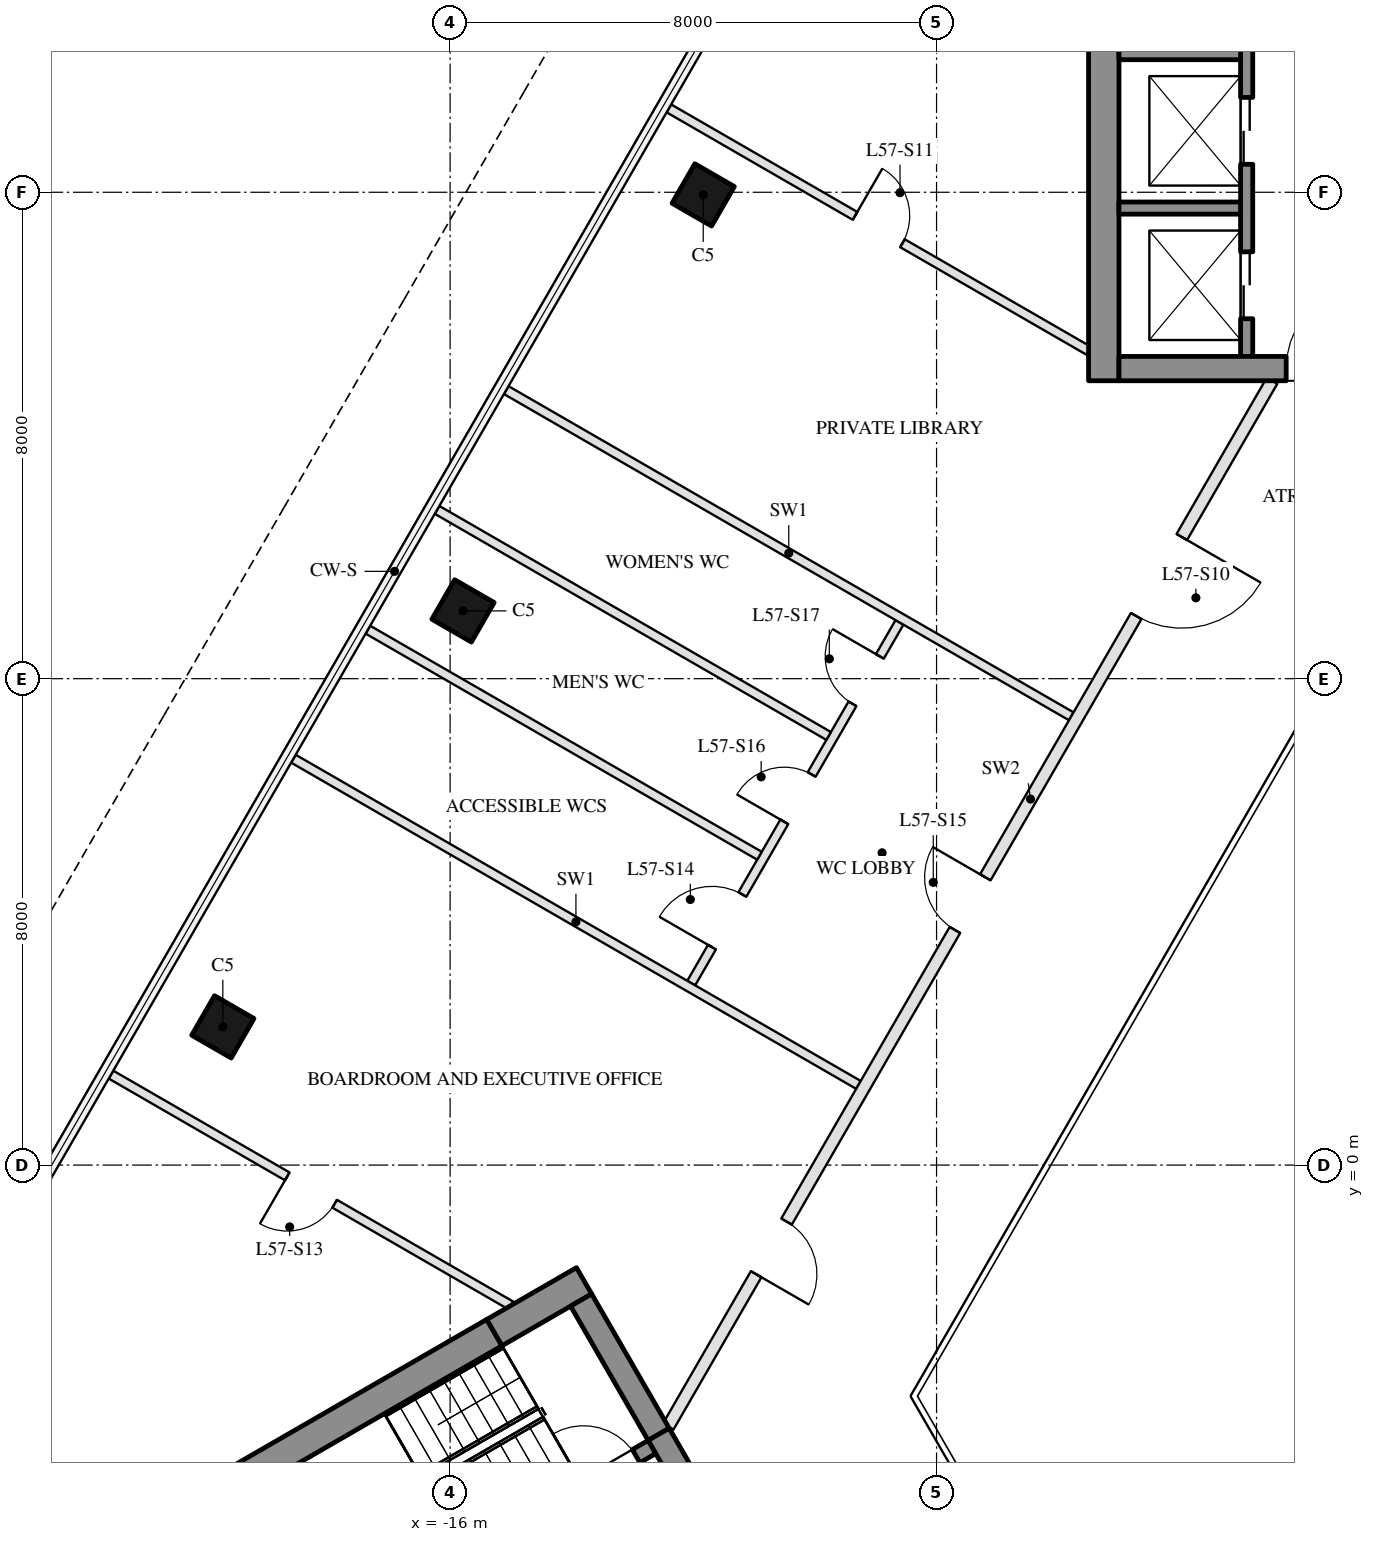
"""IFC4 building model, lengths in metres.
Left out: names, types, materials, properties, quantities, classifications, styles, units other than length and angle.
Written with IfcOpenShell. Run it as: python <this file> out.ifc"""

import sys

from ifc_helpers import new_model, si_unit, direction, frame, frame_2d, origin, origin_2d, place, context, subcontext, project, spatial, rectangle, hollow_rectangle, extrude, element, fill, save


model = new_model("IFC4")
c1 = context("Model", 3, precision=1e-05, world=origin(), true_north=direction((0.0, 1.0)))
c2 = subcontext(c1, "Body", "Model", "MODEL_VIEW")
j1 = project(units=[si_unit("LENGTHUNIT", "METRE"), si_unit("PLANEANGLEUNIT", "RADIAN")], contexts=[c1])
p1 = place(None, origin())
s1 = spatial("IfcSite", under=j1, at=p1, CompositionType="ELEMENT")
p2 = place(p1, origin())
s2 = spatial("IfcBuilding", under=s1, at=p2, CompositionType="ELEMENT")
p3 = place(p2, frame((0.0, 0.0, 231.7)))
s3 = spatial("IfcBuildingStorey", under=s2, at=p3, CompositionType="ELEMENT", Elevation=231.7)
for number, where, z_axis, x_axis in (
    (1, (-11.838, 15.957, 0.0), (0.0, 0.0, 1.0), (0.5, 0.866, 0.0)),
    (2, (-15.788, 9.115, 0.0), (0.0, 0.0, 1.0), (0.5, 0.866, 0.0)),
    (3, (-19.738, 2.273, 0.0), (0.0, 0.0, 1.0), (0.5, 0.866, 0.0)),
):
    element("IfcColumn", number, at=place(p3, frame(where, z_axis=z_axis, x_axis=x_axis)), inside=s3, PredefinedType="COLUMN", context=c2, shape_type="SweptSolid", body=[
        extrude(hollow_rectangle(XDim=0.75, YDim=0.75, WallThickness=0.035, at=origin_2d()), origin(), (0.0, 0.0, 1.0), 6.0),
    ])
p4 = place(p3, frame((-5.25, 12.9, 0.0), z_axis=(0.0, 0.0, 1.0), x_axis=(0.0, 1.0, 0.0)))
e4 = element("IfcWall", 4, at=p4, inside=s3, PredefinedType="SHEAR", context=c2, shape_type="SweptSolid", body=[
    extrude(rectangle(XDim=14.837, YDim=0.5, at=frame_2d((7.418, 0.0))), origin(), (0.0, 0.0, 1.0), 5.7),
])
p5 = place(p3, frame((-2.9, 13.3, 0.0), z_axis=(0.0, 0.0, 1.0), x_axis=(0.0, 1.0, 0.0)))
e5 = element("IfcWall", 5, at=p5, inside=s3, PredefinedType="SHEAR", context=c2, shape_type="SweptSolid", body=[
    extrude(rectangle(XDim=12.6, YDim=0.2, at=frame_2d((6.3, 0.0))), origin(), (0.0, 0.0, 1.0), 5.7),
])
p6 = place(p5, frame((0.62, 0.0, 0.0)))
e6 = element("IfcOpeningElement", 6, at=p6, cuts=e5, PredefinedType="OPENING", context=c2, shape_type="SweptSolid", body=[
    extrude(rectangle(XDim=1.1, YDim=2.1, at=frame_2d((0.55, 1.05))), frame((0.0, 0.11, 0.0), z_axis=(0.0, -1.0, 0.0), x_axis=(1.0, 0.0, 0.0)), (0.0, 0.0, 1.0), 0.22),
])
p7 = place(p5, frame((3.16, 0.0, 0.0)))
e7 = element("IfcOpeningElement", 7, at=p7, cuts=e5, PredefinedType="OPENING", context=c2, shape_type="SweptSolid", body=[
    extrude(rectangle(XDim=1.1, YDim=2.1, at=frame_2d((0.55, 1.05))), frame((0.0, 0.11, 0.0), z_axis=(0.0, -1.0, 0.0), x_axis=(1.0, 0.0, 0.0)), (0.0, 0.0, 1.0), 0.22),
])
p8 = place(p5, frame((5.7, 0.0, 0.0)))
e8 = element("IfcOpeningElement", 8, at=p8, cuts=e5, PredefinedType="OPENING", context=c2, shape_type="SweptSolid", body=[
    extrude(rectangle(XDim=1.1, YDim=2.1, at=frame_2d((0.55, 1.05))), frame((0.0, 0.11, 0.0), z_axis=(0.0, -1.0, 0.0), x_axis=(1.0, 0.0, 0.0)), (0.0, 0.0, 1.0), 0.22),
])
p9 = place(p5, frame((8.34, 0.0, 0.0)))
e9 = element("IfcOpeningElement", 9, at=p9, cuts=e5, PredefinedType="OPENING", context=c2, shape_type="SweptSolid", body=[
    extrude(rectangle(XDim=0.9, YDim=2.1, at=frame_2d((0.45, 1.05))), frame((0.0, 0.11, 0.0), z_axis=(0.0, -1.0, 0.0), x_axis=(1.0, 0.0, 0.0)), (0.0, 0.0, 1.0), 0.22),
])
p10 = place(p5, frame((10.51, 0.0, 0.0)))
e10 = element("IfcOpeningElement", 10, at=p10, cuts=e5, PredefinedType="OPENING", context=c2, shape_type="SweptSolid", body=[
    extrude(rectangle(XDim=0.9, YDim=2.1, at=frame_2d((0.45, 1.05))), frame((0.0, 0.11, 0.0), z_axis=(0.0, -1.0, 0.0), x_axis=(1.0, 0.0, 0.0)), (0.0, 0.0, 1.0), 0.22),
])
for number, where, z_axis, x_axis in (
    (11, (-3.0, 15.74, 0.0), (0.0, 0.0, 1.0), (-1.0, 0.0, 0.0)),
    (12, (-3.0, 18.28, 0.0), (0.0, 0.0, 1.0), (-1.0, 0.0, 0.0)),
):
    element("IfcWall", number, at=place(p3, frame(where, z_axis=z_axis, x_axis=x_axis)), inside=s3, PredefinedType="SHEAR", context=c2, shape_type="SweptSolid", body=[
        extrude(rectangle(XDim=2.0, YDim=0.2, at=frame_2d((1.0, 0.0))), origin(), (0.0, 0.0, 1.0), 5.7),
    ])
p11 = place(p3, frame((2.45, 13.1, 0.0), z_axis=(0.0, 0.0, 1.0), x_axis=(-1.0, 0.0, 0.0)))
e13 = element("IfcWall", 13, at=p11, inside=s3, PredefinedType="SHEAR", context=c2, shape_type="SweptSolid", body=[
    extrude(rectangle(XDim=7.45, YDim=0.4, at=frame_2d((3.725, 0.0))), origin(), (0.0, 0.0, 1.0), 5.7),
])
p12 = place(p11, frame((1.0, 0.0, 0.0)))
e14 = element("IfcOpeningElement", 14, at=p12, cuts=e13, PredefinedType="OPENING", context=c2, shape_type="SweptSolid", body=[
    extrude(rectangle(XDim=1.1, YDim=2.1, at=frame_2d((0.55, 1.05))), frame((0.0, 0.21, 0.0), z_axis=(0.0, -1.0, 0.0), x_axis=(1.0, 0.0, 0.0)), (0.0, 0.0, 1.0), 0.42),
])
p13 = place(p11, frame((3.3, 0.0, 0.0)))
e15 = element("IfcOpeningElement", 15, at=p13, cuts=e13, PredefinedType="OPENING", context=c2, shape_type="SweptSolid", body=[
    extrude(rectangle(XDim=1.4, YDim=2.1, at=frame_2d((0.7, 1.05))), frame((0.0, 0.21, 0.0), z_axis=(0.0, -1.0, 0.0), x_axis=(1.0, 0.0, 0.0)), (0.0, 0.0, 1.0), 0.42),
])
p14 = place(p3, frame((-13.797, -1.903, 0.0), z_axis=(0.0, 0.0, 1.0), x_axis=(-0.866033076574, -0.499986710104, 0.0)))
e16 = element("IfcWall", 16, at=p14, inside=s3, PredefinedType="SHEAR", context=c2, shape_type="SweptSolid", body=[
    extrude(rectangle(XDim=1.706, YDim=0.5, at=frame_2d((0.853, 0.0))), origin(), (0.0, 0.0, 1.0), 5.7),
])
p15 = place(p3, frame((-15.274, -2.756, 0.0), z_axis=(0.0, 0.0, 1.0), x_axis=(-0.86602396135, -0.500002498361, 0.0)))
e17 = element("IfcWall", 17, at=p15, inside=s3, PredefinedType="SHEAR", context=c2, shape_type="SweptSolid", body=[
    extrude(rectangle(XDim=13.131, YDim=0.5, at=frame_2d((6.565, 0.0))), origin(), (0.0, 0.0, 1.0), 5.7),
])
p16 = place(p3, frame((-13.845, -2.22, 0.0), z_axis=(0.0, 0.0, 1.0), x_axis=(0.500062241894, -0.865989465428, 0.0)))
e18 = element("IfcWall", 18, at=p16, inside=s3, PredefinedType="SHEAR", context=c2, shape_type="SweptSolid", body=[
    extrude(rectangle(XDim=2.55, YDim=0.4, at=frame_2d((1.275, 0.0))), origin(), (0.0, 0.0, 1.0), 5.7),
])
p17 = place(p3, frame((-12.57, -4.428, 0.0), z_axis=(0.0, 0.0, 1.0), x_axis=(0.499984378957, -0.86603442241, 0.0)))
e19 = element("IfcWall", 19, at=p17, inside=s3, PredefinedType="SHEAR", context=c2, shape_type="SweptSolid", body=[
    extrude(rectangle(XDim=7.45, YDim=0.4, at=frame_2d((3.725, 0.0))), origin(), (0.0, 0.0, 1.0), 5.7),
])
p18 = place(p17, frame((1.0, 0.0, 0.0)))
e20 = element("IfcOpeningElement", 20, at=p18, cuts=e19, PredefinedType="OPENING", context=c2, shape_type="SweptSolid", body=[
    extrude(rectangle(XDim=1.1, YDim=2.1, at=frame_2d((0.55, 1.05))), frame((0.0, 0.21, 0.0), z_axis=(0.0, -1.0, 0.0), x_axis=(1.0, 0.0, 0.0)), (0.0, 0.0, 1.0), 0.42),
])
p19 = place(p17, frame((3.3, 0.0, 0.0)))
e21 = element("IfcOpeningElement", 21, at=p19, cuts=e19, PredefinedType="OPENING", context=c2, shape_type="SweptSolid", body=[
    extrude(rectangle(XDim=1.4, YDim=2.1, at=frame_2d((0.7, 1.05))), frame((0.0, 0.21, 0.0), z_axis=(0.0, -1.0, 0.0), x_axis=(1.0, 0.0, 0.0)), (0.0, 0.0, 1.0), 0.42),
])
p20 = place(p3, frame((-12.681, -4.636, 0.0), z_axis=(0.0, 0.0, 1.0), x_axis=(-0.86601437931, -0.500019094464, 0.0)))
e22 = element("IfcWall", 22, at=p20, inside=s3, PredefinedType="SHEAR", context=c2, shape_type="SweptSolid", body=[
    extrude(rectangle(XDim=1.306, YDim=0.25, at=frame_2d((0.653, 0.0))), origin(), (0.0, 0.0, 1.0), 5.7),
])
p21 = place(p20, frame((0.3, 0.0, 0.0)))
e23 = element("IfcOpeningElement", 23, at=p21, cuts=e22, PredefinedType="OPENING", context=c2, shape_type="SweptSolid", body=[
    extrude(rectangle(XDim=1.0, YDim=2.1, at=frame_2d((0.5, 1.05))), frame((0.0, 0.135, 0.0), z_axis=(0.0, -1.0, 0.0), x_axis=(1.0, 0.0, 0.0)), (0.0, 0.0, 1.0), 0.27),
])
p22 = place(p3, frame((-8.61, 8.926, 0.0), z_axis=(0.0, 0.0, 1.0), x_axis=(-0.500014519185, -0.866017020967, 0.0)))
e24 = element("IfcWall", 24, at=p22, inside=s3, PredefinedType="PARTITIONING", context=c2, shape_type="SweptSolid", body=[
    extrude(rectangle(XDim=6.85, YDim=0.15, at=frame_2d((3.425, 0.0))), origin(), (0.0, 0.0, 1.0), 5.01),
])
p23 = place(p22, frame((5.167, 0.0, 0.0)))
e25 = element("IfcOpeningElement", 25, at=p23, cuts=e24, PredefinedType="OPENING", context=c2, shape_type="SweptSolid", body=[
    extrude(rectangle(XDim=1.0, YDim=2.1, at=frame_2d((0.5, 1.05))), frame((0.0, 0.085, 0.0), z_axis=(0.0, -1.0, 0.0), x_axis=(1.0, 0.0, 0.0)), (0.0, 0.0, 1.0), 0.17),
])
p24 = place(p22, frame((2.887, 0.0, 0.0)))
e26 = element("IfcOpeningElement", 26, at=p24, cuts=e24, PredefinedType="OPENING", context=c2, shape_type="SweptSolid", body=[
    extrude(rectangle(XDim=0.9, YDim=2.1, at=frame_2d((0.45, 1.05))), frame((0.0, 0.085, 0.0), z_axis=(0.0, -1.0, 0.0), x_axis=(1.0, 0.0, 0.0)), (0.0, 0.0, 1.0), 0.17),
])
p25 = place(p22, frame((0.646, 0.0, 0.0)))
e27 = element("IfcOpeningElement", 27, at=p25, cuts=e24, PredefinedType="OPENING", context=c2, shape_type="SweptSolid", body=[
    extrude(rectangle(XDim=0.9, YDim=2.1, at=frame_2d((0.45, 1.05))), frame((0.0, 0.085, 0.0), z_axis=(0.0, -1.0, 0.0), x_axis=(1.0, 0.0, 0.0)), (0.0, 0.0, 1.0), 0.17),
])
p26 = place(p3, frame((-12.402, 17.379, 0.0), z_axis=(0.0, 0.0, 1.0), x_axis=(0.866021319631, -0.500007073895, 0.0)))
e28 = element("IfcWall", 28, at=p26, inside=s3, PredefinedType="PARTITIONING", context=c2, shape_type="SweptSolid", body=[
    extrude(rectangle(XDim=7.97, YDim=0.15, at=frame_2d((3.985, 0.0))), origin(), (0.0, 0.0, 1.0), 5.7),
])
p27 = place(p26, frame((3.535, 0.0, 0.0)))
e29 = element("IfcOpeningElement", 29, at=p27, cuts=e28, PredefinedType="OPENING", context=c2, shape_type="SweptSolid", body=[
    extrude(rectangle(XDim=0.9, YDim=2.1, at=frame_2d((0.45, 1.05))), frame((0.0, 0.085, 0.0), z_axis=(0.0, -1.0, 0.0), x_axis=(1.0, 0.0, 0.0)), (0.0, 0.0, 1.0), 0.17),
])
p28 = place(p3, frame((-15.077, 12.746, 0.0), z_axis=(0.0, 0.0, 1.0), x_axis=(0.866026447599, -0.499998192055, 0.0)))
e30 = element("IfcWall", 30, at=p28, inside=s3, PredefinedType="PARTITIONING", context=c2, shape_type="SweptSolid", body=[
    extrude(rectangle(XDim=10.73, YDim=0.15, at=frame_2d((5.365, 0.0))), origin(), (0.0, 0.0, 1.0), 5.7),
])
for number, where, z_axis, x_axis in (
    (31, (-16.214, 10.776, 0.0), (0.0, 0.0, 1.0), (0.866, -0.5, 0.0)),
    (32, (-17.352, 8.806, 0.0), (0.0, 0.0, 1.0), (0.866, -0.5, 0.0)),
):
    element("IfcWall", number, at=place(p3, frame(where, z_axis=z_axis, x_axis=x_axis)), inside=s3, PredefinedType="PARTITIONING", context=c2, shape_type="SweptSolid", body=[
        extrude(rectangle(XDim=7.436, YDim=0.15, at=frame_2d((3.718, 0.0))), origin(), (0.0, 0.0, 1.0), 5.7),
    ])
p29 = place(p3, frame((-18.577, 6.684, 0.0), z_axis=(0.0, 0.0, 1.0), x_axis=(0.866026447599, -0.499998192055, 0.0)))
e33 = element("IfcWall", 33, at=p29, inside=s3, PredefinedType="PARTITIONING", context=c2, shape_type="SweptSolid", body=[
    extrude(rectangle(XDim=10.73, YDim=0.15, at=frame_2d((5.365, 0.0))), origin(), (0.0, 0.0, 1.0), 5.7),
])
p30 = place(p3, frame((-21.577, 1.488, 0.0), z_axis=(0.0, 0.0, 1.0), x_axis=(0.866014808974, -0.500018350302, 0.0)))
e34 = element("IfcWall", 34, at=p30, inside=s3, PredefinedType="PARTITIONING", context=c2, shape_type="SweptSolid", body=[
    extrude(rectangle(XDim=7.594, YDim=0.15, at=frame_2d((3.797, 0.0))), origin(), (0.0, 0.0, 1.0), 5.7),
])
p31 = place(p30, frame((3.347, 0.0, 0.0)))
e35 = element("IfcOpeningElement", 35, at=p31, cuts=e34, PredefinedType="OPENING", context=c2, shape_type="SweptSolid", body=[
    extrude(rectangle(XDim=0.9, YDim=2.1, at=frame_2d((0.45, 1.05))), frame((0.0, 0.085, 0.0), z_axis=(0.0, -1.0, 0.0), x_axis=(1.0, 0.0, 0.0)), (0.0, 0.0, 1.0), 0.17),
])
p32 = place(p3, frame((-2.482, 12.9, 0.0), z_axis=(0.0, 0.0, 1.0), x_axis=(-0.50000478328, -0.866022642139, 0.0)))
e36 = element("IfcWall", 36, at=p32, inside=s3, PredefinedType="PARTITIONING", context=c2, shape_type="SweptSolid", body=[
    extrude(rectangle(XDim=19.861, YDim=0.2, at=frame_2d((9.931, 0.0))), origin(), (0.0, 0.0, 1.0), 4.91),
])
p33 = place(p32, frame((2.968, 0.0, 0.0)))
e37 = element("IfcOpeningElement", 37, at=p33, cuts=e36, PredefinedType="OPENING", context=c2, shape_type="SweptSolid", body=[
    extrude(rectangle(XDim=1.5, YDim=2.1, at=frame_2d((0.75, 1.05))), frame((0.0, 0.11, 0.0), z_axis=(0.0, -1.0, 0.0), x_axis=(1.0, 0.0, 0.0)), (0.0, 0.0, 1.0), 0.22),
])
p34 = place(p32, frame((15.968, 0.0, 0.0)))
e38 = element("IfcOpeningElement", 38, at=p34, cuts=e36, PredefinedType="OPENING", context=c2, shape_type="SweptSolid", body=[
    extrude(rectangle(XDim=1.0, YDim=2.1, at=frame_2d((0.5, 1.05))), frame((0.0, 0.11, 0.0), z_axis=(0.0, -1.0, 0.0), x_axis=(1.0, 0.0, 0.0)), (0.0, 0.0, 1.0), 0.22),
])
p35 = place(p32, frame((9.43, 0.0, 0.0)))
e39 = element("IfcOpeningElement", 39, at=p35, cuts=e36, PredefinedType="OPENING", context=c2, shape_type="SweptSolid", body=[
    extrude(rectangle(XDim=1.0, YDim=2.1, at=frame_2d((0.5, 1.05))), frame((0.0, 0.11, 0.0), z_axis=(0.0, -1.0, 0.0), x_axis=(1.0, 0.0, 0.0)), (0.0, 0.0, 1.0), 0.22),
])
p36 = place(p6, origin())
e40 = element("IfcDoor", 40, at=p36, inside=s3, OperationType="DOUBLE_DOOR_SLIDING", PredefinedType="DOOR", context=c2, shape_type="SweptSolid", body=[
    extrude(rectangle(XDim=1.1, YDim=2.1, at=frame_2d((0.55, 1.05))), frame((0.0, 0.025, 0.0), z_axis=(0.0, -1.0, 0.0), x_axis=(1.0, 0.0, 0.0)), (0.0, 0.0, 1.0), 0.05),
])
fill(e6, e40)
p37 = place(p7, origin())
e41 = element("IfcDoor", 41, at=p37, inside=s3, OperationType="DOUBLE_DOOR_SLIDING", PredefinedType="DOOR", context=c2, shape_type="SweptSolid", body=[
    extrude(rectangle(XDim=1.1, YDim=2.1, at=frame_2d((0.55, 1.05))), frame((0.0, 0.025, 0.0), z_axis=(0.0, -1.0, 0.0), x_axis=(1.0, 0.0, 0.0)), (0.0, 0.0, 1.0), 0.05),
])
fill(e7, e41)
p38 = place(p13, frame((1.4, 0.0, 0.0), z_axis=(0.0, 0.0, 1.0), x_axis=(-1.0, 0.0, 0.0)))
e42 = element("IfcDoor", 42, at=p38, inside=s3, OperationType="DOUBLE_DOOR_SINGLE_SWING", PredefinedType="DOOR", context=c2, shape_type="SweptSolid", body=[
    extrude(rectangle(XDim=1.4, YDim=2.1, at=frame_2d((0.7, 1.05))), frame((0.0, 0.025, 0.0), z_axis=(0.0, -1.0, 0.0), x_axis=(1.0, 0.0, 0.0)), (0.0, 0.0, 1.0), 0.05),
])
fill(e15, e42)
p39 = place(p21, frame((1.0, 0.0, 0.0), z_axis=(0.0, 0.0, 1.0), x_axis=(-1.0, 0.0, 0.0)))
e43 = element("IfcDoor", 43, at=p39, inside=s3, OperationType="SINGLE_SWING_LEFT", PredefinedType="DOOR", context=c2, shape_type="SweptSolid", body=[
    extrude(rectangle(XDim=1.0, YDim=2.1, at=frame_2d((0.5, 1.05))), frame((0.0, 0.025, 0.0), z_axis=(0.0, -1.0, 0.0), x_axis=(1.0, 0.0, 0.0)), (0.0, 0.0, 1.0), 0.05),
])
fill(e23, e43)
p40 = place(p33, origin())
e44 = element("IfcDoor", 44, at=p40, inside=s3, OperationType="DOUBLE_DOOR_SINGLE_SWING", PredefinedType="DOOR", context=c2, shape_type="SweptSolid", body=[
    extrude(rectangle(XDim=1.5, YDim=2.1, at=frame_2d((0.75, 1.05))), frame((0.0, 0.025, 0.0), z_axis=(0.0, -1.0, 0.0), x_axis=(1.0, 0.0, 0.0)), (0.0, 0.0, 1.0), 0.05),
])
fill(e37, e44)
p41 = place(p27, origin())
e45 = element("IfcDoor", 45, at=p41, inside=s3, OperationType="SINGLE_SWING_LEFT", PredefinedType="DOOR", context=c2, shape_type="SweptSolid", body=[
    extrude(rectangle(XDim=0.9, YDim=2.1, at=frame_2d((0.45, 1.05))), frame((0.0, 0.025, 0.0), z_axis=(0.0, -1.0, 0.0), x_axis=(1.0, 0.0, 0.0)), (0.0, 0.0, 1.0), 0.05),
])
fill(e29, e45)
p42 = place(p34, origin())
e46 = element("IfcDoor", 46, at=p42, inside=s3, OperationType="SINGLE_SWING_RIGHT", PredefinedType="DOOR", context=c2, shape_type="SweptSolid", body=[
    extrude(rectangle(XDim=1.0, YDim=2.1, at=frame_2d((0.5, 1.05))), frame((0.0, 0.025, 0.0), z_axis=(0.0, -1.0, 0.0), x_axis=(1.0, 0.0, 0.0)), (0.0, 0.0, 1.0), 0.05),
])
fill(e38, e46)
p43 = place(p31, frame((0.9, 0.0, 0.0), z_axis=(0.0, 0.0, 1.0), x_axis=(-1.0, 0.0, 0.0)))
e47 = element("IfcDoor", 47, at=p43, inside=s3, OperationType="SINGLE_SWING_RIGHT", PredefinedType="DOOR", context=c2, shape_type="SweptSolid", body=[
    extrude(rectangle(XDim=0.9, YDim=2.1, at=frame_2d((0.45, 1.05))), frame((0.0, 0.025, 0.0), z_axis=(0.0, -1.0, 0.0), x_axis=(1.0, 0.0, 0.0)), (0.0, 0.0, 1.0), 0.05),
])
fill(e35, e47)
p44 = place(p23, frame((1.0, 0.0, 0.0), z_axis=(0.0, 0.0, 1.0), x_axis=(-1.0, 0.0, 0.0)))
e48 = element("IfcDoor", 48, at=p44, inside=s3, OperationType="SINGLE_SWING_LEFT", PredefinedType="DOOR", context=c2, shape_type="SweptSolid", body=[
    extrude(rectangle(XDim=1.0, YDim=2.1, at=frame_2d((0.5, 1.05))), frame((0.0, 0.025, 0.0), z_axis=(0.0, -1.0, 0.0), x_axis=(1.0, 0.0, 0.0)), (0.0, 0.0, 1.0), 0.05),
])
fill(e25, e48)
p45 = place(p35, frame((1.0, 0.0, 0.0), z_axis=(0.0, 0.0, 1.0), x_axis=(-1.0, 0.0, 0.0)))
e49 = element("IfcDoor", 49, at=p45, inside=s3, OperationType="SINGLE_SWING_RIGHT", PredefinedType="DOOR", context=c2, shape_type="SweptSolid", body=[
    extrude(rectangle(XDim=1.0, YDim=2.1, at=frame_2d((0.5, 1.05))), frame((0.0, 0.025, 0.0), z_axis=(0.0, -1.0, 0.0), x_axis=(1.0, 0.0, 0.0)), (0.0, 0.0, 1.0), 0.05),
])
fill(e39, e49)
p46 = place(p24, frame((0.9, 0.0, 0.0), z_axis=(0.0, 0.0, 1.0), x_axis=(-1.0, 0.0, 0.0)))
e50 = element("IfcDoor", 50, at=p46, inside=s3, OperationType="SINGLE_SWING_LEFT", PredefinedType="DOOR", context=c2, shape_type="SweptSolid", body=[
    extrude(rectangle(XDim=0.9, YDim=2.1, at=frame_2d((0.45, 1.05))), frame((0.0, 0.025, 0.0), z_axis=(0.0, -1.0, 0.0), x_axis=(1.0, 0.0, 0.0)), (0.0, 0.0, 1.0), 0.05),
])
fill(e26, e50)
p47 = place(p25, frame((0.9, 0.0, 0.0), z_axis=(0.0, 0.0, 1.0), x_axis=(-1.0, 0.0, 0.0)))
e51 = element("IfcDoor", 51, at=p47, inside=s3, OperationType="SINGLE_SWING_RIGHT", PredefinedType="DOOR", context=c2, shape_type="SweptSolid", body=[
    extrude(rectangle(XDim=0.9, YDim=2.1, at=frame_2d((0.45, 1.05))), frame((0.0, 0.025, 0.0), z_axis=(0.0, -1.0, 0.0), x_axis=(1.0, 0.0, 0.0)), (0.0, 0.0, 1.0), 0.05),
])
fill(e27, e51)
save(model, sys.argv[1])
